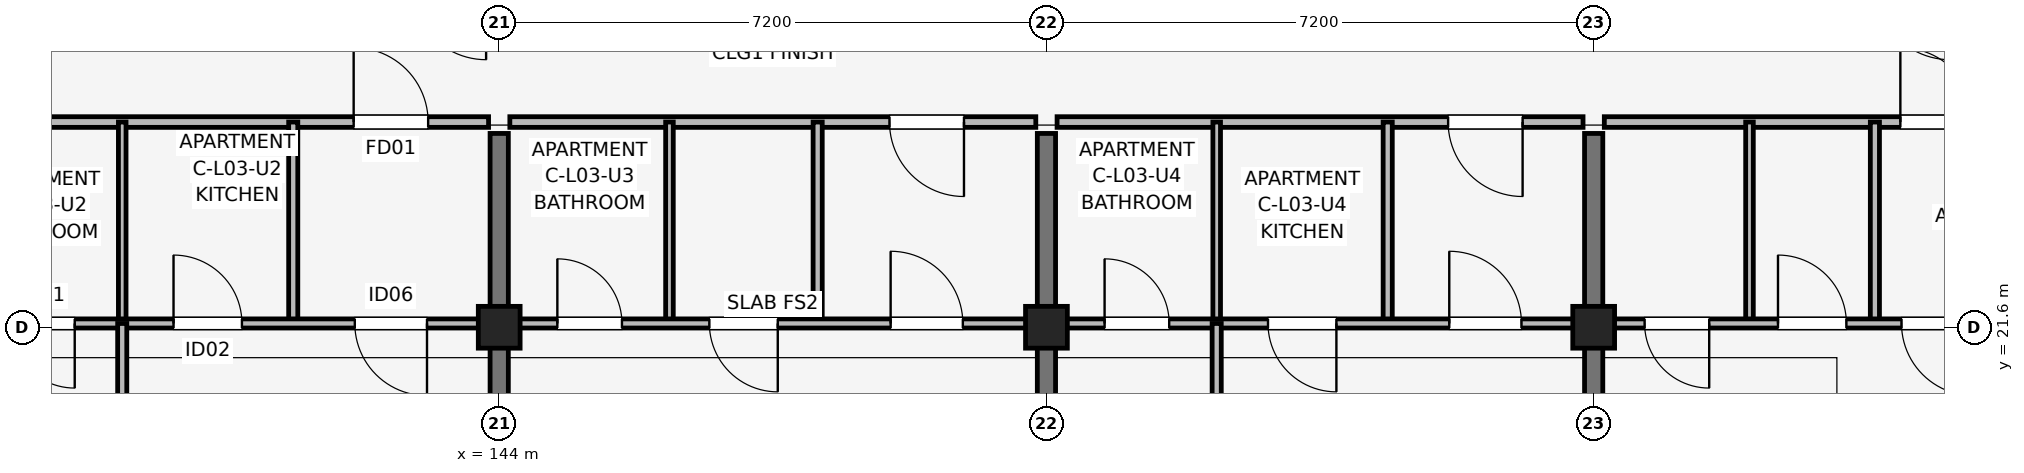
"""IFC4 building model, lengths in metres.
Left out: names, types, materials, properties, quantities, classifications, styles, units other than length and angle.
Written with IfcOpenShell. Run it as: python <this file> out.ifc"""

import sys

from ifc_helpers import new_model, si_unit, direction, frame, frame_2d, origin, origin_2d, place, context, subcontext, project, spatial, rectangle, extrude, element, fill, save


model = new_model("IFC4")
c1 = context("Model", 3, precision=1e-05, world=origin(), true_north=direction((0.0, 1.0)))
c2 = subcontext(c1, "Body", "Model", "MODEL_VIEW")
j1 = project(units=[si_unit("LENGTHUNIT", "METRE"), si_unit("PLANEANGLEUNIT", "RADIAN")], contexts=[c1])
p1 = place(None, origin())
s1 = spatial("IfcSite", under=j1, at=p1, CompositionType="ELEMENT")
p2 = place(p1, origin())
s2 = spatial("IfcBuilding", under=s1, at=p2, CompositionType="ELEMENT")
p3 = place(p2, frame((0.0, 0.0, 11.85)))
s3 = spatial("IfcBuildingStorey", under=s2, at=p3, CompositionType="ELEMENT", Elevation=11.85)
for number, where, z_axis, x_axis in (
    (1, (144.0, 21.6, 0.0), (0.0, 0.0, 1.0), (1.0, 0.0, 0.0)),
    (2, (151.2, 21.6, 0.0), (0.0, 0.0, 1.0), (1.0, 0.0, 0.0)),
    (3, (158.4, 21.6, 0.0), (0.0, 0.0, 1.0), (1.0, 0.0, 0.0)),
):
    element("IfcColumn", number, at=place(p3, frame(where, z_axis=z_axis, x_axis=x_axis)), inside=s3, PredefinedType="COLUMN", context=c2, shape_type="SweptSolid", body=[
        extrude(rectangle(XDim=0.55, YDim=0.55, at=origin_2d()), origin(), (0.0, 0.0, 1.0), 3.15),
    ])
for number, where, z_axis, x_axis in (
    (4, (144.0, 14.75, 0.0), (0.0, 0.0, 1.0), (0.0, 1.0, 0.0)),
    (5, (151.2, 14.75, 0.0), (0.0, 0.0, 1.0), (0.0, 1.0, 0.0)),
    (6, (158.4, 14.75, 0.0), (0.0, 0.0, 1.0), (0.0, 1.0, 0.0)),
):
    element("IfcWall", number, at=place(p3, frame(where, z_axis=z_axis, x_axis=x_axis)), inside=s3, PredefinedType="SHEAR", context=c2, shape_type="SweptSolid", body=[
        extrude(rectangle(XDim=9.4, YDim=0.24, at=frame_2d((4.7, 0.0))), origin(), (0.0, 0.0, 1.0), 3.15),
    ])
p4 = place(p3, frame((136.94, 24.3, 0.0), z_axis=(0.0, 0.0, 1.0), x_axis=(1.0, 0.0, 0.0)))
e7 = element("IfcWall", 7, at=p4, inside=s3, PredefinedType="PARTITIONING", context=c2, shape_type="SweptSolid", body=[
    extrude(rectangle(XDim=6.92, YDim=0.14, at=frame_2d((3.46, 0.0))), origin(), (0.0, 0.0, 1.0), 2.38),
])
p5 = place(p4, frame((5.145, 0.0, 0.0)))
e8 = element("IfcOpeningElement", 8, at=p5, cuts=e7, PredefinedType="OPENING", context=c2, shape_type="SweptSolid", body=[
    extrude(rectangle(XDim=0.98, YDim=2.1, at=frame_2d((0.49, 1.05))), frame((0.0, 0.08, 0.0), z_axis=(0.0, -1.0, 0.0), x_axis=(1.0, 0.0, 0.0)), (0.0, 0.0, 1.0), 0.16),
])
p6 = place(p3, frame((139.04, 21.65, 0.0), z_axis=(0.0, 0.0, 1.0), x_axis=(0.0, 1.0, 0.0)))
e9 = element("IfcWall", 9, at=p6, inside=s3, PredefinedType="PARTITIONING", context=c2, shape_type="SweptSolid", body=[
    extrude(rectangle(XDim=2.65, YDim=0.1, at=frame_2d((1.325, 0.0))), origin(), (0.0, 0.0, 1.0), 2.375),
])
p7 = place(p3, frame((141.29, 21.65, 0.0), z_axis=(0.0, 0.0, 1.0), x_axis=(0.0, 1.0, 0.0)))
e10 = element("IfcWall", 10, at=p7, inside=s3, PredefinedType="PARTITIONING", context=c2, shape_type="SweptSolid", body=[
    extrude(rectangle(XDim=2.65, YDim=0.12, at=frame_2d((1.325, 0.0))), origin(), (0.0, 0.0, 1.0), 2.375),
])
p8 = place(p3, frame((136.94, 21.65, 0.0), z_axis=(0.0, 0.0, 1.0), x_axis=(1.0, 0.0, 0.0)))
e11 = element("IfcWall", 11, at=p8, inside=s3, PredefinedType="PARTITIONING", context=c2, shape_type="SweptSolid", body=[
    extrude(rectangle(XDim=6.92, YDim=0.12, at=frame_2d((3.46, 0.0))), origin(), (0.0, 0.0, 1.0), 2.375),
])
p9 = place(p8, frame((1.475, 0.0, 0.0), z_axis=(0.0, 0.0, 1.0), x_axis=(-1.0, 0.0, 0.0)))
e12 = element("IfcOpeningElement", 12, at=p9, cuts=e11, PredefinedType="OPENING", context=c2, shape_type="SweptSolid", body=[
    extrude(rectangle(XDim=0.85, YDim=2.08, at=frame_2d((0.425, 1.04))), frame((0.0, 0.07, 0.0), z_axis=(0.0, -1.0, 0.0), x_axis=(1.0, 0.0, 0.0)), (0.0, 0.0, 1.0), 0.14),
])
p10 = place(p8, frame((2.775, 0.0, 0.0)))
e13 = element("IfcOpeningElement", 13, at=p10, cuts=e11, PredefinedType="OPENING", context=c2, shape_type="SweptSolid", body=[
    extrude(rectangle(XDim=0.9, YDim=2.08, at=frame_2d((0.45, 1.04))), frame((0.0, 0.07, 0.0), z_axis=(0.0, -1.0, 0.0), x_axis=(1.0, 0.0, 0.0)), (0.0, 0.0, 1.0), 0.14),
])
p11 = place(p8, frame((6.11, 0.0, 0.0), z_axis=(0.0, 0.0, 1.0), x_axis=(-1.0, 0.0, 0.0)))
e14 = element("IfcOpeningElement", 14, at=p11, cuts=e11, PredefinedType="OPENING", context=c2, shape_type="SweptSolid", body=[
    extrude(rectangle(XDim=0.95, YDim=2.08, at=frame_2d((0.475, 1.04))), frame((0.0, 0.07, 0.0), z_axis=(0.0, -1.0, 0.0), x_axis=(1.0, 0.0, 0.0)), (0.0, 0.0, 1.0), 0.14),
])
p12 = place(p3, frame((139.04, 14.7, 0.0), z_axis=(0.0, 0.0, 1.0), x_axis=(0.0, 1.0, 0.0)))
e15 = element("IfcWall", 15, at=p12, inside=s3, PredefinedType="PARTITIONING", context=c2, shape_type="SweptSolid", body=[
    extrude(rectangle(XDim=6.95, YDim=0.12, at=frame_2d((3.475, 0.0))), origin(), (0.0, 0.0, 1.0), 2.375),
])
p13 = place(p12, frame((3.025, 0.0, 0.0)))
e16 = element("IfcOpeningElement", 16, at=p13, cuts=e15, PredefinedType="OPENING", context=c2, shape_type="SweptSolid", body=[
    extrude(rectangle(XDim=0.9, YDim=2.08, at=frame_2d((0.45, 1.04))), frame((0.0, 0.07, 0.0), z_axis=(0.0, -1.0, 0.0), x_axis=(1.0, 0.0, 0.0)), (0.0, 0.0, 1.0), 0.14),
])
p14 = place(p3, frame((144.14, 24.3, 0.0), z_axis=(0.0, 0.0, 1.0), x_axis=(1.0, 0.0, 0.0)))
e17 = element("IfcWall", 17, at=p14, inside=s3, PredefinedType="PARTITIONING", context=c2, shape_type="SweptSolid", body=[
    extrude(rectangle(XDim=6.92, YDim=0.14, at=frame_2d((3.46, 0.0))), origin(), (0.0, 0.0, 1.0), 2.38),
])
p15 = place(p14, frame((5.975, 0.0, 0.0), z_axis=(0.0, 0.0, 1.0), x_axis=(-1.0, 0.0, 0.0)))
e18 = element("IfcOpeningElement", 18, at=p15, cuts=e17, PredefinedType="OPENING", context=c2, shape_type="SweptSolid", body=[
    extrude(rectangle(XDim=0.98, YDim=2.1, at=frame_2d((0.49, 1.05))), frame((0.0, 0.08, 0.0), z_axis=(0.0, -1.0, 0.0), x_axis=(1.0, 0.0, 0.0)), (0.0, 0.0, 1.0), 0.16),
])
p16 = place(p3, frame((146.24, 21.65, 0.0), z_axis=(0.0, 0.0, 1.0), x_axis=(0.0, 1.0, 0.0)))
e19 = element("IfcWall", 19, at=p16, inside=s3, PredefinedType="PARTITIONING", context=c2, shape_type="SweptSolid", body=[
    extrude(rectangle(XDim=2.65, YDim=0.1, at=frame_2d((1.325, 0.0))), origin(), (0.0, 0.0, 1.0), 2.375),
])
p17 = place(p3, frame((148.19, 21.65, 0.0), z_axis=(0.0, 0.0, 1.0), x_axis=(0.0, 1.0, 0.0)))
e20 = element("IfcWall", 20, at=p17, inside=s3, PredefinedType="PARTITIONING", context=c2, shape_type="SweptSolid", body=[
    extrude(rectangle(XDim=2.65, YDim=0.12, at=frame_2d((1.325, 0.0))), origin(), (0.0, 0.0, 1.0), 2.375),
])
p18 = place(p3, frame((144.14, 21.65, 0.0), z_axis=(0.0, 0.0, 1.0), x_axis=(1.0, 0.0, 0.0)))
e21 = element("IfcWall", 21, at=p18, inside=s3, PredefinedType="PARTITIONING", context=c2, shape_type="SweptSolid", body=[
    extrude(rectangle(XDim=6.92, YDim=0.12, at=frame_2d((3.46, 0.0))), origin(), (0.0, 0.0, 1.0), 2.375),
])
p19 = place(p18, frame((0.625, 0.0, 0.0)))
e22 = element("IfcOpeningElement", 22, at=p19, cuts=e21, PredefinedType="OPENING", context=c2, shape_type="SweptSolid", body=[
    extrude(rectangle(XDim=0.85, YDim=2.08, at=frame_2d((0.425, 1.04))), frame((0.0, 0.07, 0.0), z_axis=(0.0, -1.0, 0.0), x_axis=(1.0, 0.0, 0.0)), (0.0, 0.0, 1.0), 0.14),
])
p20 = place(p18, frame((3.525, 0.0, 0.0), z_axis=(0.0, 0.0, 1.0), x_axis=(-1.0, 0.0, 0.0)))
e23 = element("IfcOpeningElement", 23, at=p20, cuts=e21, PredefinedType="OPENING", context=c2, shape_type="SweptSolid", body=[
    extrude(rectangle(XDim=0.9, YDim=2.08, at=frame_2d((0.45, 1.04))), frame((0.0, 0.07, 0.0), z_axis=(0.0, -1.0, 0.0), x_axis=(1.0, 0.0, 0.0)), (0.0, 0.0, 1.0), 0.14),
])
p21 = place(p18, frame((5.01, 0.0, 0.0)))
e24 = element("IfcOpeningElement", 24, at=p21, cuts=e21, PredefinedType="OPENING", context=c2, shape_type="SweptSolid", body=[
    extrude(rectangle(XDim=0.95, YDim=2.08, at=frame_2d((0.475, 1.04))), frame((0.0, 0.07, 0.0), z_axis=(0.0, -1.0, 0.0), x_axis=(1.0, 0.0, 0.0)), (0.0, 0.0, 1.0), 0.14),
])
p22 = place(p3, frame((151.34, 24.3, 0.0), z_axis=(0.0, 0.0, 1.0), x_axis=(1.0, 0.0, 0.0)))
e25 = element("IfcWall", 25, at=p22, inside=s3, PredefinedType="PARTITIONING", context=c2, shape_type="SweptSolid", body=[
    extrude(rectangle(XDim=6.92, YDim=0.14, at=frame_2d((3.46, 0.0))), origin(), (0.0, 0.0, 1.0), 2.38),
])
p23 = place(p22, frame((6.125, 0.0, 0.0), z_axis=(0.0, 0.0, 1.0), x_axis=(-1.0, 0.0, 0.0)))
e26 = element("IfcOpeningElement", 26, at=p23, cuts=e25, PredefinedType="OPENING", context=c2, shape_type="SweptSolid", body=[
    extrude(rectangle(XDim=0.98, YDim=2.1, at=frame_2d((0.49, 1.05))), frame((0.0, 0.08, 0.0), z_axis=(0.0, -1.0, 0.0), x_axis=(1.0, 0.0, 0.0)), (0.0, 0.0, 1.0), 0.16),
])
p24 = place(p3, frame((153.44, 21.65, 0.0), z_axis=(0.0, 0.0, 1.0), x_axis=(0.0, 1.0, 0.0)))
e27 = element("IfcWall", 27, at=p24, inside=s3, PredefinedType="PARTITIONING", context=c2, shape_type="SweptSolid", body=[
    extrude(rectangle(XDim=2.65, YDim=0.1, at=frame_2d((1.325, 0.0))), origin(), (0.0, 0.0, 1.0), 2.375),
])
p25 = place(p3, frame((155.69, 21.65, 0.0), z_axis=(0.0, 0.0, 1.0), x_axis=(0.0, 1.0, 0.0)))
e28 = element("IfcWall", 28, at=p25, inside=s3, PredefinedType="PARTITIONING", context=c2, shape_type="SweptSolid", body=[
    extrude(rectangle(XDim=2.65, YDim=0.12, at=frame_2d((1.325, 0.0))), origin(), (0.0, 0.0, 1.0), 2.375),
])
p26 = place(p3, frame((151.34, 21.65, 0.0), z_axis=(0.0, 0.0, 1.0), x_axis=(1.0, 0.0, 0.0)))
e29 = element("IfcWall", 29, at=p26, inside=s3, PredefinedType="PARTITIONING", context=c2, shape_type="SweptSolid", body=[
    extrude(rectangle(XDim=6.92, YDim=0.12, at=frame_2d((3.46, 0.0))), origin(), (0.0, 0.0, 1.0), 2.375),
])
p27 = place(p26, frame((0.625, 0.0, 0.0)))
e30 = element("IfcOpeningElement", 30, at=p27, cuts=e29, PredefinedType="OPENING", context=c2, shape_type="SweptSolid", body=[
    extrude(rectangle(XDim=0.85, YDim=2.08, at=frame_2d((0.425, 1.04))), frame((0.0, 0.07, 0.0), z_axis=(0.0, -1.0, 0.0), x_axis=(1.0, 0.0, 0.0)), (0.0, 0.0, 1.0), 0.14),
])
p28 = place(p26, frame((3.675, 0.0, 0.0), z_axis=(0.0, 0.0, 1.0), x_axis=(-1.0, 0.0, 0.0)))
e31 = element("IfcOpeningElement", 31, at=p28, cuts=e29, PredefinedType="OPENING", context=c2, shape_type="SweptSolid", body=[
    extrude(rectangle(XDim=0.9, YDim=2.08, at=frame_2d((0.45, 1.04))), frame((0.0, 0.07, 0.0), z_axis=(0.0, -1.0, 0.0), x_axis=(1.0, 0.0, 0.0)), (0.0, 0.0, 1.0), 0.14),
])
p29 = place(p26, frame((5.16, 0.0, 0.0)))
e32 = element("IfcOpeningElement", 32, at=p29, cuts=e29, PredefinedType="OPENING", context=c2, shape_type="SweptSolid", body=[
    extrude(rectangle(XDim=0.95, YDim=2.08, at=frame_2d((0.475, 1.04))), frame((0.0, 0.07, 0.0), z_axis=(0.0, -1.0, 0.0), x_axis=(1.0, 0.0, 0.0)), (0.0, 0.0, 1.0), 0.14),
])
p30 = place(p3, frame((153.44, 14.7, 0.0), z_axis=(0.0, 0.0, 1.0), x_axis=(0.0, 1.0, 0.0)))
e33 = element("IfcWall", 33, at=p30, inside=s3, PredefinedType="PARTITIONING", context=c2, shape_type="SweptSolid", body=[
    extrude(rectangle(XDim=6.95, YDim=0.12, at=frame_2d((3.475, 0.0))), origin(), (0.0, 0.0, 1.0), 2.375),
])
p31 = place(p30, frame((3.925, 0.0, 0.0), z_axis=(0.0, 0.0, 1.0), x_axis=(-1.0, 0.0, 0.0)))
e34 = element("IfcOpeningElement", 34, at=p31, cuts=e33, PredefinedType="OPENING", context=c2, shape_type="SweptSolid", body=[
    extrude(rectangle(XDim=0.9, YDim=2.08, at=frame_2d((0.45, 1.04))), frame((0.0, 0.07, 0.0), z_axis=(0.0, -1.0, 0.0), x_axis=(1.0, 0.0, 0.0)), (0.0, 0.0, 1.0), 0.14),
])
p32 = place(p3, frame((158.54, 24.3, 0.0), z_axis=(0.0, 0.0, 1.0), x_axis=(1.0, 0.0, 0.0)))
e35 = element("IfcWall", 35, at=p32, inside=s3, PredefinedType="PARTITIONING", context=c2, shape_type="SweptSolid", body=[
    extrude(rectangle(XDim=6.92, YDim=0.14, at=frame_2d((3.46, 0.0))), origin(), (0.0, 0.0, 1.0), 2.38),
])
p33 = place(p32, frame((3.895, 0.0, 0.0)))
e36 = element("IfcOpeningElement", 36, at=p33, cuts=e35, PredefinedType="OPENING", context=c2, shape_type="SweptSolid", body=[
    extrude(rectangle(XDim=0.98, YDim=2.1, at=frame_2d((0.49, 1.05))), frame((0.0, 0.08, 0.0), z_axis=(0.0, -1.0, 0.0), x_axis=(1.0, 0.0, 0.0)), (0.0, 0.0, 1.0), 0.16),
])
p34 = place(p3, frame((160.45, 21.65, 0.0), z_axis=(0.0, 0.0, 1.0), x_axis=(0.0, 1.0, 0.0)))
e37 = element("IfcWall", 37, at=p34, inside=s3, PredefinedType="PARTITIONING", context=c2, shape_type="SweptSolid", body=[
    extrude(rectangle(XDim=2.65, YDim=0.1, at=frame_2d((1.325, 0.0))), origin(), (0.0, 0.0, 1.0), 2.375),
])
p35 = place(p3, frame((162.1, 21.65, 0.0), z_axis=(0.0, 0.0, 1.0), x_axis=(0.0, 1.0, 0.0)))
e38 = element("IfcWall", 38, at=p35, inside=s3, PredefinedType="PARTITIONING", context=c2, shape_type="SweptSolid", body=[
    extrude(rectangle(XDim=2.65, YDim=0.12, at=frame_2d((1.325, 0.0))), origin(), (0.0, 0.0, 1.0), 2.375),
])
p36 = place(p3, frame((158.54, 21.65, 0.0), z_axis=(0.0, 0.0, 1.0), x_axis=(1.0, 0.0, 0.0)))
e39 = element("IfcWall", 39, at=p36, inside=s3, PredefinedType="PARTITIONING", context=c2, shape_type="SweptSolid", body=[
    extrude(rectangle(XDim=6.92, YDim=0.12, at=frame_2d((3.46, 0.0))), origin(), (0.0, 0.0, 1.0), 2.375),
])
p37 = place(p36, frame((1.38, 0.0, 0.0), z_axis=(0.0, 0.0, 1.0), x_axis=(-1.0, 0.0, 0.0)))
e40 = element("IfcOpeningElement", 40, at=p37, cuts=e39, PredefinedType="OPENING", context=c2, shape_type="SweptSolid", body=[
    extrude(rectangle(XDim=0.85, YDim=2.08, at=frame_2d((0.425, 1.04))), frame((0.0, 0.07, 0.0), z_axis=(0.0, -1.0, 0.0), x_axis=(1.0, 0.0, 0.0)), (0.0, 0.0, 1.0), 0.14),
])
p38 = place(p36, frame((2.285, 0.0, 0.0)))
e41 = element("IfcOpeningElement", 41, at=p38, cuts=e39, PredefinedType="OPENING", context=c2, shape_type="SweptSolid", body=[
    extrude(rectangle(XDim=0.9, YDim=2.08, at=frame_2d((0.45, 1.04))), frame((0.0, 0.07, 0.0), z_axis=(0.0, -1.0, 0.0), x_axis=(1.0, 0.0, 0.0)), (0.0, 0.0, 1.0), 0.14),
])
p39 = place(p36, frame((4.86, 0.0, 0.0), z_axis=(0.0, 0.0, 1.0), x_axis=(-1.0, 0.0, 0.0)))
e42 = element("IfcOpeningElement", 42, at=p39, cuts=e39, PredefinedType="OPENING", context=c2, shape_type="SweptSolid", body=[
    extrude(rectangle(XDim=0.95, YDim=2.08, at=frame_2d((0.475, 1.04))), frame((0.0, 0.07, 0.0), z_axis=(0.0, -1.0, 0.0), x_axis=(1.0, 0.0, 0.0)), (0.0, 0.0, 1.0), 0.14),
])
p40 = place(p5, origin())
e43 = element("IfcDoor", 43, at=p40, inside=s3, OperationType="SINGLE_SWING_LEFT", PredefinedType="DOOR", context=c2, shape_type="SweptSolid", body=[
    extrude(rectangle(XDim=0.98, YDim=2.1, at=frame_2d((0.49, 1.05))), frame((0.0, 0.025, 0.0), z_axis=(0.0, -1.0, 0.0), x_axis=(1.0, 0.0, 0.0)), (0.0, 0.0, 1.0), 0.05),
])
fill(e8, e43)
p41 = place(p9, origin())
e44 = element("IfcDoor", 44, at=p41, inside=s3, OperationType="SINGLE_SWING_RIGHT", PredefinedType="DOOR", context=c2, shape_type="SweptSolid", body=[
    extrude(rectangle(XDim=0.85, YDim=2.08, at=frame_2d((0.425, 1.04))), frame((0.0, 0.025, 0.0), z_axis=(0.0, -1.0, 0.0), x_axis=(1.0, 0.0, 0.0)), (0.0, 0.0, 1.0), 0.05),
])
fill(e12, e44)
p42 = place(p10, origin())
e45 = element("IfcDoor", 45, at=p42, inside=s3, OperationType="SINGLE_SWING_LEFT", PredefinedType="DOOR", context=c2, shape_type="SweptSolid", body=[
    extrude(rectangle(XDim=0.9, YDim=2.08, at=frame_2d((0.45, 1.04))), frame((0.0, 0.025, 0.0), z_axis=(0.0, -1.0, 0.0), x_axis=(1.0, 0.0, 0.0)), (0.0, 0.0, 1.0), 0.05),
])
fill(e13, e45)
p43 = place(p11, origin())
e46 = element("IfcDoor", 46, at=p43, inside=s3, OperationType="SINGLE_SWING_RIGHT", PredefinedType="DOOR", context=c2, shape_type="SweptSolid", body=[
    extrude(rectangle(XDim=0.95, YDim=2.08, at=frame_2d((0.475, 1.04))), frame((0.0, 0.025, 0.0), z_axis=(0.0, -1.0, 0.0), x_axis=(1.0, 0.0, 0.0)), (0.0, 0.0, 1.0), 0.05),
])
fill(e14, e46)
p44 = place(p15, origin())
e47 = element("IfcDoor", 47, at=p44, inside=s3, OperationType="SINGLE_SWING_RIGHT", PredefinedType="DOOR", context=c2, shape_type="SweptSolid", body=[
    extrude(rectangle(XDim=0.98, YDim=2.1, at=frame_2d((0.49, 1.05))), frame((0.0, 0.025, 0.0), z_axis=(0.0, -1.0, 0.0), x_axis=(1.0, 0.0, 0.0)), (0.0, 0.0, 1.0), 0.05),
])
fill(e18, e47)
p45 = place(p19, origin())
e48 = element("IfcDoor", 48, at=p45, inside=s3, OperationType="SINGLE_SWING_LEFT", PredefinedType="DOOR", context=c2, shape_type="SweptSolid", body=[
    extrude(rectangle(XDim=0.85, YDim=2.08, at=frame_2d((0.425, 1.04))), frame((0.0, 0.025, 0.0), z_axis=(0.0, -1.0, 0.0), x_axis=(1.0, 0.0, 0.0)), (0.0, 0.0, 1.0), 0.05),
])
fill(e22, e48)
p46 = place(p20, origin())
e49 = element("IfcDoor", 49, at=p46, inside=s3, OperationType="SINGLE_SWING_RIGHT", PredefinedType="DOOR", context=c2, shape_type="SweptSolid", body=[
    extrude(rectangle(XDim=0.9, YDim=2.08, at=frame_2d((0.45, 1.04))), frame((0.0, 0.025, 0.0), z_axis=(0.0, -1.0, 0.0), x_axis=(1.0, 0.0, 0.0)), (0.0, 0.0, 1.0), 0.05),
])
fill(e23, e49)
p47 = place(p21, origin())
e50 = element("IfcDoor", 50, at=p47, inside=s3, OperationType="SINGLE_SWING_LEFT", PredefinedType="DOOR", context=c2, shape_type="SweptSolid", body=[
    extrude(rectangle(XDim=0.95, YDim=2.08, at=frame_2d((0.475, 1.04))), frame((0.0, 0.025, 0.0), z_axis=(0.0, -1.0, 0.0), x_axis=(1.0, 0.0, 0.0)), (0.0, 0.0, 1.0), 0.05),
])
fill(e24, e50)
p48 = place(p23, origin())
e51 = element("IfcDoor", 51, at=p48, inside=s3, OperationType="SINGLE_SWING_RIGHT", PredefinedType="DOOR", context=c2, shape_type="SweptSolid", body=[
    extrude(rectangle(XDim=0.98, YDim=2.1, at=frame_2d((0.49, 1.05))), frame((0.0, 0.025, 0.0), z_axis=(0.0, -1.0, 0.0), x_axis=(1.0, 0.0, 0.0)), (0.0, 0.0, 1.0), 0.05),
])
fill(e26, e51)
p49 = place(p27, origin())
e52 = element("IfcDoor", 52, at=p49, inside=s3, OperationType="SINGLE_SWING_LEFT", PredefinedType="DOOR", context=c2, shape_type="SweptSolid", body=[
    extrude(rectangle(XDim=0.85, YDim=2.08, at=frame_2d((0.425, 1.04))), frame((0.0, 0.025, 0.0), z_axis=(0.0, -1.0, 0.0), x_axis=(1.0, 0.0, 0.0)), (0.0, 0.0, 1.0), 0.05),
])
fill(e30, e52)
p50 = place(p28, origin())
e53 = element("IfcDoor", 53, at=p50, inside=s3, OperationType="SINGLE_SWING_RIGHT", PredefinedType="DOOR", context=c2, shape_type="SweptSolid", body=[
    extrude(rectangle(XDim=0.9, YDim=2.08, at=frame_2d((0.45, 1.04))), frame((0.0, 0.025, 0.0), z_axis=(0.0, -1.0, 0.0), x_axis=(1.0, 0.0, 0.0)), (0.0, 0.0, 1.0), 0.05),
])
fill(e31, e53)
p51 = place(p29, origin())
e54 = element("IfcDoor", 54, at=p51, inside=s3, OperationType="SINGLE_SWING_LEFT", PredefinedType="DOOR", context=c2, shape_type="SweptSolid", body=[
    extrude(rectangle(XDim=0.95, YDim=2.08, at=frame_2d((0.475, 1.04))), frame((0.0, 0.025, 0.0), z_axis=(0.0, -1.0, 0.0), x_axis=(1.0, 0.0, 0.0)), (0.0, 0.0, 1.0), 0.05),
])
fill(e32, e54)
p52 = place(p33, origin())
e55 = element("IfcDoor", 55, at=p52, inside=s3, OperationType="SINGLE_SWING_LEFT", PredefinedType="DOOR", context=c2, shape_type="SweptSolid", body=[
    extrude(rectangle(XDim=0.98, YDim=2.1, at=frame_2d((0.49, 1.05))), frame((0.0, 0.025, 0.0), z_axis=(0.0, -1.0, 0.0), x_axis=(1.0, 0.0, 0.0)), (0.0, 0.0, 1.0), 0.05),
])
fill(e36, e55)
p53 = place(p37, origin())
e56 = element("IfcDoor", 56, at=p53, inside=s3, OperationType="SINGLE_SWING_RIGHT", PredefinedType="DOOR", context=c2, shape_type="SweptSolid", body=[
    extrude(rectangle(XDim=0.85, YDim=2.08, at=frame_2d((0.425, 1.04))), frame((0.0, 0.025, 0.0), z_axis=(0.0, -1.0, 0.0), x_axis=(1.0, 0.0, 0.0)), (0.0, 0.0, 1.0), 0.05),
])
fill(e40, e56)
p54 = place(p38, origin())
e57 = element("IfcDoor", 57, at=p54, inside=s3, OperationType="SINGLE_SWING_LEFT", PredefinedType="DOOR", context=c2, shape_type="SweptSolid", body=[
    extrude(rectangle(XDim=0.9, YDim=2.08, at=frame_2d((0.45, 1.04))), frame((0.0, 0.025, 0.0), z_axis=(0.0, -1.0, 0.0), x_axis=(1.0, 0.0, 0.0)), (0.0, 0.0, 1.0), 0.05),
])
fill(e41, e57)
p55 = place(p39, origin())
e58 = element("IfcDoor", 58, at=p55, inside=s3, OperationType="SINGLE_SWING_RIGHT", PredefinedType="DOOR", context=c2, shape_type="SweptSolid", body=[
    extrude(rectangle(XDim=0.95, YDim=2.08, at=frame_2d((0.475, 1.04))), frame((0.0, 0.025, 0.0), z_axis=(0.0, -1.0, 0.0), x_axis=(1.0, 0.0, 0.0)), (0.0, 0.0, 1.0), 0.05),
])
fill(e42, e58)
save(model, sys.argv[1])
